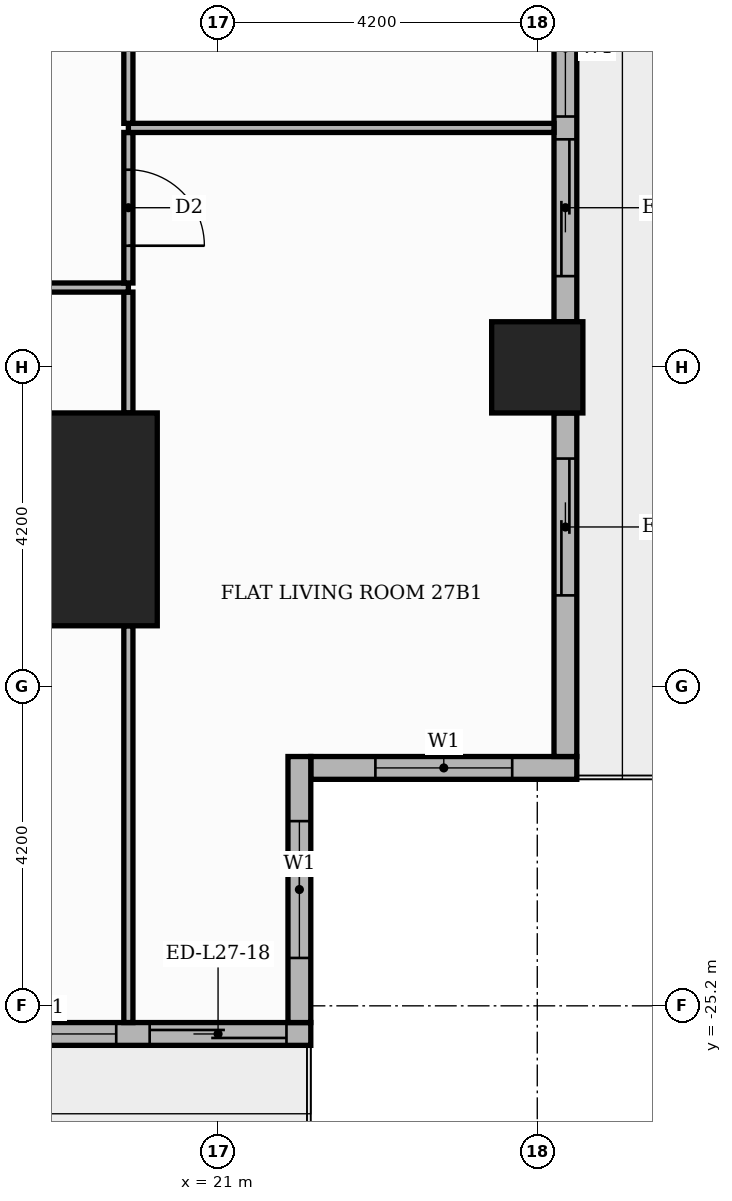
"""IFC4 building model, lengths in metres.
Left out: names, types, materials, properties, quantities, classifications, styles, units other than length and angle.
Written with IfcOpenShell. Run it as: python <this file> out.ifc"""

import sys

from ifc_helpers import new_model, si_unit, direction, frame, frame_2d, origin, origin_2d, place, context, subcontext, project, spatial, rectangle, extrude, element, fill, save


model = new_model("IFC4")
c1 = context("Model", 3, precision=1e-05, world=origin(), true_north=direction((0.0, 1.0)))
c2 = subcontext(c1, "Body", "Model", "MODEL_VIEW")
j1 = project(units=[si_unit("LENGTHUNIT", "METRE"), si_unit("PLANEANGLEUNIT", "RADIAN")], contexts=[c1])
p1 = place(None, origin())
s1 = spatial("IfcSite", under=j1, at=p1, CompositionType="ELEMENT")
p2 = place(p1, origin())
s2 = spatial("IfcBuilding", under=s1, at=p2, CompositionType="ELEMENT")
p3 = place(p2, frame((0.0, 0.0, 114.3)))
s3 = spatial("IfcBuildingStorey", under=s2, at=p3, CompositionType="ELEMENT", Elevation=114.3)
p4 = place(p3, frame((18.8, -18.8, 0.0), z_axis=(0.0, 0.0, 1.0), x_axis=(1.0, 0.0, 0.0)))
e1 = element("IfcColumn", 1, at=p4, inside=s3, PredefinedType="COLUMN", context=c2, shape_type="SweptSolid", body=[
    extrude(rectangle(XDim=2.8, YDim=2.8, at=origin_2d()), origin(), (0.0, 0.0, 1.0), 3.9),
])
p5 = place(p3, frame((25.2, -16.8, 0.0), z_axis=(0.0, 0.0, 1.0), x_axis=(1.0, 0.0, 0.0)))
e2 = element("IfcColumn", 2, at=p5, inside=s3, PredefinedType="COLUMN", context=c2, shape_type="SweptSolid", body=[
    extrude(rectangle(XDim=1.2, YDim=1.2, at=origin_2d()), origin(), (0.0, 0.0, 1.0), 3.9),
])
p6 = place(p3, frame((22.22, -22.07, 0.0), z_axis=(0.0, 0.0, 1.0), x_axis=(1.0, 0.0, 0.0)))
e3 = element("IfcWall", 3, at=p6, inside=s3, PredefinedType="STANDARD", context=c2, shape_type="SweptSolid", body=[
    extrude(rectangle(XDim=3.5, YDim=0.3, at=frame_2d((1.75, 0.0))), origin(), (0.0, 0.0, 1.0), 3.48),
])
p7 = place(p6, frame((0.85, 0.0, 0.9)))
e4 = element("IfcOpeningElement", 4, at=p7, cuts=e3, PredefinedType="OPENING", context=c2, shape_type="SweptSolid", body=[
    extrude(rectangle(XDim=1.8, YDim=2.1, at=frame_2d((0.9, 1.05))), frame((0.0, 0.16, 0.0), z_axis=(0.0, -1.0, 0.0), x_axis=(1.0, 0.0, 0.0)), (0.0, 0.0, 1.0), 0.32),
])
p8 = place(p3, frame((25.57, -21.92, 0.0), z_axis=(0.0, 0.0, 1.0), x_axis=(0.0, 1.0, 0.0)))
e5 = element("IfcWall", 5, at=p8, inside=s3, PredefinedType="STANDARD", context=c2, shape_type="SweptSolid", body=[
    extrude(rectangle(XDim=4.52, YDim=0.3, at=frame_2d((2.26, 0.0))), origin(), (0.0, 0.0, 1.0), 3.48),
])
p9 = place(p8, frame((2.12, 0.0, 0.0)))
e6 = element("IfcOpeningElement", 6, at=p9, cuts=e5, PredefinedType="OPENING", context=c2, shape_type="SweptSolid", body=[
    extrude(rectangle(XDim=1.8, YDim=2.4, at=frame_2d((0.9, 1.2))), frame((0.0, 0.16, 0.0), z_axis=(0.0, -1.0, 0.0), x_axis=(1.0, 0.0, 0.0)), (0.0, 0.0, 1.0), 0.32),
])
p10 = place(p3, frame((25.57, -16.2, 0.0), z_axis=(0.0, 0.0, 1.0), x_axis=(0.0, 1.0, 0.0)))
e7 = element("IfcWall", 7, at=p10, inside=s3, PredefinedType="STANDARD", context=c2, shape_type="SweptSolid", body=[
    extrude(rectangle(XDim=7.2, YDim=0.3, at=frame_2d((3.6, 0.0))), origin(), (0.0, 0.0, 1.0), 3.48),
])
p11 = place(p10, frame((0.6, 0.0, 0.0)))
e8 = element("IfcOpeningElement", 8, at=p11, cuts=e7, PredefinedType="OPENING", context=c2, shape_type="SweptSolid", body=[
    extrude(rectangle(XDim=1.8, YDim=2.4, at=frame_2d((0.9, 1.2))), frame((0.0, 0.16, 0.0), z_axis=(0.0, -1.0, 0.0), x_axis=(1.0, 0.0, 0.0)), (0.0, 0.0, 1.0), 0.32),
])
p12 = place(p10, frame((2.7, 0.0, 0.9)))
e9 = element("IfcOpeningElement", 9, at=p12, cuts=e7, PredefinedType="OPENING", context=c2, shape_type="SweptSolid", body=[
    extrude(rectangle(XDim=1.8, YDim=2.1, at=frame_2d((0.9, 1.05))), frame((0.0, 0.16, 0.0), z_axis=(0.0, -1.0, 0.0), x_axis=(1.0, 0.0, 0.0)), (0.0, 0.0, 1.0), 0.32),
])
p13 = place(p10, frame((4.8, 0.0, 0.0)))
e10 = element("IfcOpeningElement", 10, at=p13, cuts=e7, PredefinedType="OPENING", context=c2, shape_type="SweptSolid", body=[
    extrude(rectangle(XDim=1.8, YDim=2.4, at=frame_2d((0.9, 1.2))), frame((0.0, 0.16, 0.0), z_axis=(0.0, -1.0, 0.0), x_axis=(1.0, 0.0, 0.0)), (0.0, 0.0, 1.0), 0.32),
])
p14 = place(p3, frame((17.4, -25.57, 0.0), z_axis=(0.0, 0.0, 1.0), x_axis=(1.0, 0.0, 0.0)))
e11 = element("IfcWall", 11, at=p14, inside=s3, PredefinedType="STANDARD", context=c2, shape_type="SweptSolid", body=[
    extrude(rectangle(XDim=4.82, YDim=0.3, at=frame_2d((2.41, 0.0))), origin(), (0.0, 0.0, 1.0), 3.48),
])
p15 = place(p14, frame((2.7, 0.0, 0.0)))
e12 = element("IfcOpeningElement", 12, at=p15, cuts=e11, PredefinedType="OPENING", context=c2, shape_type="SweptSolid", body=[
    extrude(rectangle(XDim=1.8, YDim=2.4, at=frame_2d((0.9, 1.2))), frame((0.0, 0.16, 0.0), z_axis=(0.0, -1.0, 0.0), x_axis=(1.0, 0.0, 0.0)), (0.0, 0.0, 1.0), 0.32),
])
p16 = place(p14, frame((0.46, 0.0, 0.9)))
e13 = element("IfcOpeningElement", 13, at=p16, cuts=e11, PredefinedType="OPENING", context=c2, shape_type="SweptSolid", body=[
    extrude(rectangle(XDim=1.8, YDim=2.1, at=frame_2d((0.9, 1.05))), frame((0.0, 0.16, 0.0), z_axis=(0.0, -1.0, 0.0), x_axis=(1.0, 0.0, 0.0)), (0.0, 0.0, 1.0), 0.32),
])
p17 = place(p3, frame((22.07, -25.42, 0.0), z_axis=(0.0, 0.0, 1.0), x_axis=(0.0, 1.0, 0.0)))
e14 = element("IfcWall", 14, at=p17, inside=s3, PredefinedType="STANDARD", context=c2, shape_type="SweptSolid", body=[
    extrude(rectangle(XDim=3.5, YDim=0.3, at=frame_2d((1.75, 0.0))), origin(), (0.0, 0.0, 1.0), 3.48),
])
p18 = place(p17, frame((0.85, 0.0, 0.9)))
e15 = element("IfcOpeningElement", 15, at=p18, cuts=e14, PredefinedType="OPENING", context=c2, shape_type="SweptSolid", body=[
    extrude(rectangle(XDim=1.8, YDim=2.1, at=frame_2d((0.9, 1.05))), frame((0.0, 0.16, 0.0), z_axis=(0.0, -1.0, 0.0), x_axis=(1.0, 0.0, 0.0)), (0.0, 0.0, 1.0), 0.32),
])
p19 = place(p3, frame((19.82, -25.42, 0.0), z_axis=(0.0, 0.0, 1.0), x_axis=(0.0, 1.0, 0.0)))
e16 = element("IfcWall", 16, at=p19, inside=s3, PredefinedType="PARTITIONING", context=c2, shape_type="SweptSolid", body=[
    extrude(rectangle(XDim=5.22, YDim=0.12, at=frame_2d((2.61, 0.0))), origin(), (0.0, 0.0, 1.0), 3.48),
])
p20 = place(p3, frame((19.82, -17.4, 0.0), z_axis=(0.0, 0.0, 1.0), x_axis=(0.0, 1.0, 0.0)))
e17 = element("IfcWall", 17, at=p20, inside=s3, PredefinedType="PARTITIONING", context=c2, shape_type="SweptSolid", body=[
    extrude(rectangle(XDim=1.59, YDim=0.12, at=frame_2d((0.795, 0.0))), origin(), (0.0, 0.0, 1.0), 3.48),
])
p21 = place(p3, frame((13.75, -15.75, 0.0), z_axis=(0.0, 0.0, 1.0), x_axis=(1.0, 0.0, 0.0)))
e18 = element("IfcWall", 18, at=p21, inside=s3, PredefinedType="PARTITIONING", context=c2, shape_type="SweptSolid", body=[
    extrude(rectangle(XDim=6.07, YDim=0.12, at=frame_2d((3.035, 0.0))), origin(), (0.0, 0.0, 1.0), 3.48),
])
p22 = place(p21, frame((2.535, 0.0, 0.0)))
e19 = element("IfcOpeningElement", 19, at=p22, cuts=e18, PredefinedType="OPENING", context=c2, shape_type="SweptSolid", body=[
    extrude(rectangle(XDim=0.9, YDim=2.1, at=frame_2d((0.45, 1.05))), frame((0.0, 0.07, 0.0), z_axis=(0.0, -1.0, 0.0), x_axis=(1.0, 0.0, 0.0)), (0.0, 0.0, 1.0), 0.14),
])
p23 = place(p3, frame((19.82, -15.69, 0.0), z_axis=(0.0, 0.0, 1.0), x_axis=(0.0, 1.0, 0.0)))
e20 = element("IfcWall", 20, at=p23, inside=s3, PredefinedType="PARTITIONING", context=c2, shape_type="SweptSolid", body=[
    extrude(rectangle(XDim=1.98, YDim=0.12, at=frame_2d((0.99, 0.0))), origin(), (0.0, 0.0, 1.0), 3.48),
])
p24 = place(p23, frame((0.49, 0.0, 0.0)))
e21 = element("IfcOpeningElement", 21, at=p24, cuts=e20, PredefinedType="OPENING", context=c2, shape_type="SweptSolid", body=[
    extrude(rectangle(XDim=1.0, YDim=2.1, at=frame_2d((0.5, 1.05))), frame((0.0, 0.07, 0.0), z_axis=(0.0, -1.0, 0.0), x_axis=(1.0, 0.0, 0.0)), (0.0, 0.0, 1.0), 0.14),
])
p25 = place(p3, frame((19.82, -13.65, 0.0), z_axis=(0.0, 0.0, 1.0), x_axis=(1.0, 0.0, 0.0)))
e22 = element("IfcWall", 22, at=p25, inside=s3, PredefinedType="PARTITIONING", context=c2, shape_type="SweptSolid", body=[
    extrude(rectangle(XDim=5.6, YDim=0.12, at=frame_2d((2.8, 0.0))), origin(), (0.0, 0.0, 1.0), 3.48),
])
p26 = place(p3, frame((19.82, -13.59, 0.0), z_axis=(0.0, 0.0, 1.0), x_axis=(0.0, 1.0, 0.0)))
e23 = element("IfcWall", 23, at=p26, inside=s3, PredefinedType="PARTITIONING", context=c2, shape_type="SweptSolid", body=[
    extrude(rectangle(XDim=6.18, YDim=0.12, at=frame_2d((3.09, 0.0))), origin(), (0.0, 0.0, 1.0), 3.48),
])
p27 = place(p26, frame((2.64, 0.0, 0.0)))
e24 = element("IfcOpeningElement", 24, at=p27, cuts=e23, PredefinedType="OPENING", context=c2, shape_type="SweptSolid", body=[
    extrude(rectangle(XDim=0.9, YDim=2.1, at=frame_2d((0.45, 1.05))), frame((0.0, 0.07, 0.0), z_axis=(0.0, -1.0, 0.0), x_axis=(1.0, 0.0, 0.0)), (0.0, 0.0, 1.0), 0.14),
])
p28 = place(p7, origin())
e25 = element("IfcWindow", 25, at=p28, inside=s3, PartitioningType="SINGLE_PANEL", PredefinedType="WINDOW", context=c2, shape_type="SweptSolid", body=[
    extrude(rectangle(XDim=1.8, YDim=2.1, at=frame_2d((0.9, 1.05))), frame((0.0, 0.03, 0.0), z_axis=(0.0, -1.0, 0.0), x_axis=(1.0, 0.0, 0.0)), (0.0, 0.0, 1.0), 0.06),
])
fill(e4, e25)
p29 = place(p9, origin())
e26 = element("IfcDoor", 26, at=p29, inside=s3, OperationType="SLIDING_TO_RIGHT", PredefinedType="DOOR", context=c2, shape_type="SweptSolid", body=[
    extrude(rectangle(XDim=1.8, YDim=2.4, at=frame_2d((0.9, 1.2))), frame((0.0, 0.025, 0.0), z_axis=(0.0, -1.0, 0.0), x_axis=(1.0, 0.0, 0.0)), (0.0, 0.0, 1.0), 0.05),
])
fill(e6, e26)
p30 = place(p11, origin())
e27 = element("IfcDoor", 27, at=p30, inside=s3, OperationType="SLIDING_TO_LEFT", PredefinedType="DOOR", context=c2, shape_type="SweptSolid", body=[
    extrude(rectangle(XDim=1.8, YDim=2.4, at=frame_2d((0.9, 1.2))), frame((0.0, 0.025, 0.0), z_axis=(0.0, -1.0, 0.0), x_axis=(1.0, 0.0, 0.0)), (0.0, 0.0, 1.0), 0.05),
])
fill(e8, e27)
p31 = place(p12, origin())
e28 = element("IfcWindow", 28, at=p31, inside=s3, PartitioningType="SINGLE_PANEL", PredefinedType="WINDOW", context=c2, shape_type="SweptSolid", body=[
    extrude(rectangle(XDim=1.8, YDim=2.1, at=frame_2d((0.9, 1.05))), frame((0.0, 0.03, 0.0), z_axis=(0.0, -1.0, 0.0), x_axis=(1.0, 0.0, 0.0)), (0.0, 0.0, 1.0), 0.06),
])
fill(e9, e28)
p32 = place(p15, origin())
e29 = element("IfcDoor", 29, at=p32, inside=s3, OperationType="SLIDING_TO_LEFT", PredefinedType="DOOR", context=c2, shape_type="SweptSolid", body=[
    extrude(rectangle(XDim=1.8, YDim=2.4, at=frame_2d((0.9, 1.2))), frame((0.0, 0.025, 0.0), z_axis=(0.0, -1.0, 0.0), x_axis=(1.0, 0.0, 0.0)), (0.0, 0.0, 1.0), 0.05),
])
fill(e12, e29)
p33 = place(p16, origin())
e30 = element("IfcWindow", 30, at=p33, inside=s3, PartitioningType="SINGLE_PANEL", PredefinedType="WINDOW", context=c2, shape_type="SweptSolid", body=[
    extrude(rectangle(XDim=1.8, YDim=2.1, at=frame_2d((0.9, 1.05))), frame((0.0, 0.03, 0.0), z_axis=(0.0, -1.0, 0.0), x_axis=(1.0, 0.0, 0.0)), (0.0, 0.0, 1.0), 0.06),
])
fill(e13, e30)
p34 = place(p18, origin())
e31 = element("IfcWindow", 31, at=p34, inside=s3, PartitioningType="SINGLE_PANEL", PredefinedType="WINDOW", context=c2, shape_type="SweptSolid", body=[
    extrude(rectangle(XDim=1.8, YDim=2.1, at=frame_2d((0.9, 1.05))), frame((0.0, 0.03, 0.0), z_axis=(0.0, -1.0, 0.0), x_axis=(1.0, 0.0, 0.0)), (0.0, 0.0, 1.0), 0.06),
])
fill(e15, e31)
p35 = place(p24, frame((1.0, 0.0, 0.0), z_axis=(0.0, 0.0, 1.0), x_axis=(-1.0, 0.0, 0.0)))
e32 = element("IfcDoor", 32, at=p35, inside=s3, OperationType="SINGLE_SWING_LEFT", PredefinedType="DOOR", context=c2, shape_type="SweptSolid", body=[
    extrude(rectangle(XDim=1.0, YDim=2.1, at=frame_2d((0.5, 1.05))), frame((0.0, 0.025, 0.0), z_axis=(0.0, -1.0, 0.0), x_axis=(1.0, 0.0, 0.0)), (0.0, 0.0, 1.0), 0.05),
])
fill(e21, e32)
save(model, sys.argv[1])
